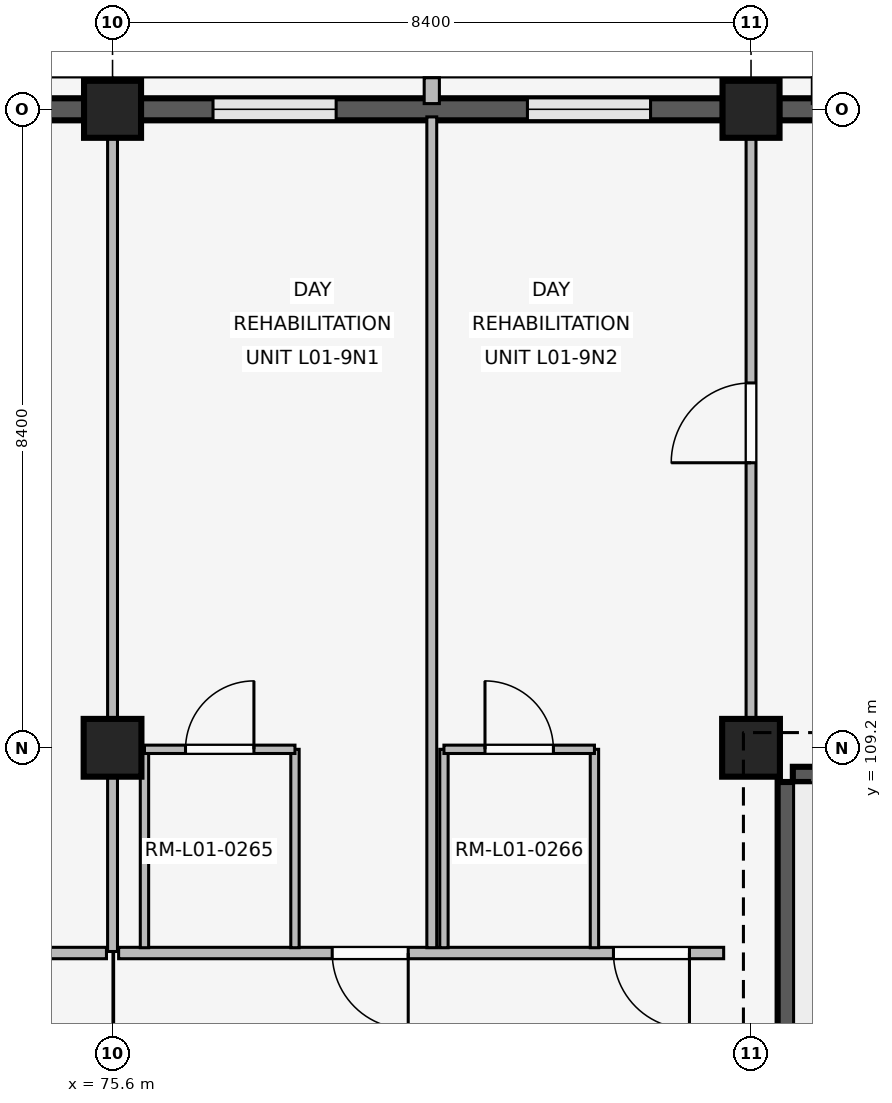
"""IFC4 building model, lengths in metres.
Left out: names, types, materials, properties, quantities, classifications, styles, units other than length and angle.
Written with IfcOpenShell. Run it as: python <this file> out.ifc"""

import sys

from ifc_helpers import new_model, si_unit, direction, frame, frame_2d, origin, origin_2d, place, context, subcontext, project, spatial, rectangle, extrude, element, fill, save


model = new_model("IFC4")
c1 = context("Model", 3, precision=1e-05, world=origin(), true_north=direction((0.0, 1.0)))
c2 = subcontext(c1, "Body", "Model", "MODEL_VIEW")
j1 = project(units=[si_unit("LENGTHUNIT", "METRE"), si_unit("PLANEANGLEUNIT", "RADIAN")], contexts=[c1])
p1 = place(None, origin())
s1 = spatial("IfcSite", under=j1, at=p1, CompositionType="ELEMENT")
p2 = place(p1, origin())
s2 = spatial("IfcBuilding", under=s1, at=p2, CompositionType="ELEMENT")
p3 = place(p2, frame((0.0, 0.0, 4.8)))
s3 = spatial("IfcBuildingStorey", under=s2, at=p3, CompositionType="ELEMENT", Elevation=4.8)
p4 = place(p3, frame((75.6, 109.2, 0.0), z_axis=(0.0, 0.0, 1.0), x_axis=(1.0, 0.0, 0.0)))
e1 = element("IfcColumn", 1, at=p4, inside=s3, PredefinedType="COLUMN", context=c2, shape_type="SweptSolid", body=[
    extrude(rectangle(XDim=0.76, YDim=0.76, at=origin_2d()), origin(), (0.0, 0.0, 1.0), 3.3),
])
p5 = place(p3, frame((75.6, 117.6, 0.0), z_axis=(0.0, 0.0, 1.0), x_axis=(1.0, 0.0, 0.0)))
e2 = element("IfcColumn", 2, at=p5, inside=s3, PredefinedType="COLUMN", context=c2, shape_type="SweptSolid", body=[
    extrude(rectangle(XDim=0.75, YDim=0.75, at=origin_2d()), origin(), (0.0, 0.0, 1.0), 3.3),
])
p6 = place(p3, frame((84.0, 109.2, 0.0), z_axis=(0.0, 0.0, 1.0), x_axis=(1.0, 0.0, 0.0)))
e3 = element("IfcColumn", 3, at=p6, inside=s3, PredefinedType="COLUMN", context=c2, shape_type="SweptSolid", body=[
    extrude(rectangle(XDim=0.76, YDim=0.76, at=origin_2d()), origin(), (0.0, 0.0, 1.0), 3.3),
])
p7 = place(p3, frame((84.0, 117.6, 0.0), z_axis=(0.0, 0.0, 1.0), x_axis=(1.0, 0.0, 0.0)))
e4 = element("IfcColumn", 4, at=p7, inside=s3, PredefinedType="COLUMN", context=c2, shape_type="SweptSolid", body=[
    extrude(rectangle(XDim=0.75, YDim=0.75, at=origin_2d()), origin(), (0.0, 0.0, 1.0), 3.3),
])
p8 = place(p3, frame((67.57, 117.6, 0.0), z_axis=(0.0, 0.0, 1.0), x_axis=(1.0, 0.0, 0.0)))
e5 = element("IfcWall", 5, at=p8, inside=s3, PredefinedType="SOLIDWALL", context=c2, shape_type="SweptSolid", body=[
    extrude(rectangle(XDim=7.66, YDim=0.29, at=frame_2d((3.83, 0.0))), origin(), (0.0, 0.0, 1.0), 2.42),
])
p9 = place(p8, frame((1.032, 0.0, 0.85)))
e6 = element("IfcOpeningElement", 6, at=p9, cuts=e5, PredefinedType="OPENING", context=c2, shape_type="SweptSolid", body=[
    extrude(rectangle(XDim=1.46, YDim=0.85, at=frame_2d((0.73, 0.425))), frame((0.0, 0.155, 0.0), z_axis=(0.0, -1.0, 0.0), x_axis=(1.0, 0.0, 0.0)), (0.0, 0.0, 1.0), 0.31),
])
p10 = place(p8, frame((5.168, 0.0, 0.85)))
e7 = element("IfcOpeningElement", 7, at=p10, cuts=e5, PredefinedType="OPENING", context=c2, shape_type="SweptSolid", body=[
    extrude(rectangle(XDim=1.46, YDim=0.85, at=frame_2d((0.73, 0.425))), frame((0.0, 0.155, 0.0), z_axis=(0.0, -1.0, 0.0), x_axis=(1.0, 0.0, 0.0)), (0.0, 0.0, 1.0), 0.31),
])
p11 = place(p3, frame((75.97, 117.6, 0.0), z_axis=(0.0, 0.0, 1.0), x_axis=(1.0, 0.0, 0.0)))
e8 = element("IfcWall", 8, at=p11, inside=s3, PredefinedType="SOLIDWALL", context=c2, shape_type="SweptSolid", body=[
    extrude(rectangle(XDim=7.66, YDim=0.29, at=frame_2d((3.83, 0.0))), origin(), (0.0, 0.0, 1.0), 2.42),
])
p12 = place(p11, frame((0.952, 0.0, 0.85)))
e9 = element("IfcOpeningElement", 9, at=p12, cuts=e8, PredefinedType="OPENING", context=c2, shape_type="SweptSolid", body=[
    extrude(rectangle(XDim=1.62, YDim=0.95, at=frame_2d((0.81, 0.475))), frame((0.0, 0.155, 0.0), z_axis=(0.0, -1.0, 0.0), x_axis=(1.0, 0.0, 0.0)), (0.0, 0.0, 1.0), 0.31),
])
p13 = place(p11, frame((5.088, 0.0, 0.85)))
e10 = element("IfcOpeningElement", 10, at=p13, cuts=e8, PredefinedType="OPENING", context=c2, shape_type="SweptSolid", body=[
    extrude(rectangle(XDim=1.62, YDim=0.95, at=frame_2d((0.81, 0.475))), frame((0.0, 0.155, 0.0), z_axis=(0.0, -1.0, 0.0), x_axis=(1.0, 0.0, 0.0)), (0.0, 0.0, 1.0), 0.31),
])
p14 = place(p3, frame((79.8, 117.675, 0.0), z_axis=(0.0, 0.0, 1.0), x_axis=(0.0, 1.0, 0.0)))
e11 = element("IfcWall", 11, at=p14, inside=s3, PredefinedType="ELEMENTEDWALL", context=c2, shape_type="SweptSolid", body=[
    extrude(rectangle(XDim=0.34, YDim=0.2, at=frame_2d((0.17, 0.0))), origin(), (0.0, 0.0, 1.0), 2.4),
])
p15 = place(p3, frame((84.37, 117.6, 0.0), z_axis=(0.0, 0.0, 1.0), x_axis=(1.0, 0.0, 0.0)))
e12 = element("IfcWall", 12, at=p15, inside=s3, PredefinedType="SOLIDWALL", context=c2, shape_type="SweptSolid", body=[
    extrude(rectangle(XDim=7.66, YDim=0.29, at=frame_2d((3.83, 0.0))), origin(), (0.0, 0.0, 1.0), 2.42),
])
p16 = place(p15, frame((1.032, 0.0, 0.85)))
e13 = element("IfcOpeningElement", 13, at=p16, cuts=e12, PredefinedType="OPENING", context=c2, shape_type="SweptSolid", body=[
    extrude(rectangle(XDim=1.46, YDim=0.85, at=frame_2d((0.73, 0.425))), frame((0.0, 0.155, 0.0), z_axis=(0.0, -1.0, 0.0), x_axis=(1.0, 0.0, 0.0)), (0.0, 0.0, 1.0), 0.31),
])
p17 = place(p15, frame((5.168, 0.0, 0.85)))
e14 = element("IfcOpeningElement", 14, at=p17, cuts=e12, PredefinedType="OPENING", context=c2, shape_type="SweptSolid", body=[
    extrude(rectangle(XDim=1.46, YDim=0.85, at=frame_2d((0.73, 0.425))), frame((0.0, 0.155, 0.0), z_axis=(0.0, -1.0, 0.0), x_axis=(1.0, 0.0, 0.0)), (0.0, 0.0, 1.0), 0.31),
])
p18 = place(p3, frame((84.55, 108.75, 0.0), z_axis=(0.0, 0.0, 1.0), x_axis=(1.0, 0.0, 0.0)))
e15 = element("IfcWall", 15, at=p18, inside=s3, PredefinedType="SHEAR", context=c2, shape_type="SweptSolid", body=[
    extrude(rectangle(XDim=7.5, YDim=0.4, at=frame_2d((3.75, 0.0))), origin(), (0.0, 0.0, 1.0), 3.02),
])
p19 = place(p3, frame((84.55, 101.2, 0.0), z_axis=(0.0, 0.0, 1.0), x_axis=(0.0, 1.0, 0.0)))
e16 = element("IfcWall", 16, at=p19, inside=s3, PredefinedType="SHEAR", context=c2, shape_type="SweptSolid", body=[
    extrude(rectangle(XDim=7.55, YDim=0.4, at=frame_2d((3.775, 0.0))), origin(), (0.0, 0.0, 1.0), 3.02),
])
p20 = place(p19, frame((0.28, 0.0, 0.0)))
e17 = element("IfcOpeningElement", 17, at=p20, cuts=e16, PredefinedType="OPENING", context=c2, shape_type="SweptSolid", body=[
    extrude(rectangle(XDim=1.0, YDim=2.15, at=frame_2d((0.5, 1.075))), frame((0.0, 0.21, 0.0), z_axis=(0.0, -1.0, 0.0), x_axis=(1.0, 0.0, 0.0)), (0.0, 0.0, 1.0), 0.42),
])
p21 = place(p3, frame((75.52, 106.5, 0.0), z_axis=(0.0, 0.0, 1.0), x_axis=(-1.0, 0.0, 0.0)))
e18 = element("IfcWall", 18, at=p21, inside=s3, PredefinedType="PARTITIONING", context=c2, shape_type="SweptSolid", body=[
    extrude(rectangle(XDim=8.24, YDim=0.15, at=frame_2d((4.12, 0.0))), origin(), (0.0, 0.0, 1.0), 2.4),
])
p22 = place(p21, frame((3.57, 0.0, 0.0)))
e19 = element("IfcOpeningElement", 19, at=p22, cuts=e18, PredefinedType="OPENING", context=c2, shape_type="SweptSolid", body=[
    extrude(rectangle(XDim=1.1, YDim=2.2, at=frame_2d((0.55, 1.1))), frame((0.0, 0.085, 0.0), z_axis=(0.0, -1.0, 0.0), x_axis=(1.0, 0.0, 0.0)), (0.0, 0.0, 1.0), 0.17),
])
p23 = place(p3, frame((75.6, 106.52, 0.0), z_axis=(0.0, 0.0, 1.0), x_axis=(0.0, 1.0, 0.0)))
e20 = element("IfcWall", 20, at=p23, inside=s3, PredefinedType="PARTITIONING", context=c2, shape_type="SweptSolid", body=[
    extrude(rectangle(XDim=10.94, YDim=0.13, at=frame_2d((5.47, 0.0))), origin(), (0.0, 0.0, 1.0), 2.4),
])
p24 = place(p3, frame((83.64, 106.5, 0.0), z_axis=(0.0, 0.0, 1.0), x_axis=(-1.0, 0.0, 0.0)))
e21 = element("IfcWall", 21, at=p24, inside=s3, PredefinedType="PARTITIONING", context=c2, shape_type="SweptSolid", body=[
    extrude(rectangle(XDim=7.96, YDim=0.15, at=frame_2d((3.98, 0.0))), origin(), (0.0, 0.0, 1.0), 2.4),
])
p25 = place(p24, frame((0.45, 0.0, 0.0)))
e22 = element("IfcOpeningElement", 22, at=p25, cuts=e21, PredefinedType="OPENING", context=c2, shape_type="SweptSolid", body=[
    extrude(rectangle(XDim=1.0, YDim=2.15, at=frame_2d((0.5, 1.075))), frame((0.0, 0.085, 0.0), z_axis=(0.0, -1.0, 0.0), x_axis=(1.0, 0.0, 0.0)), (0.0, 0.0, 1.0), 0.17),
])
p26 = place(p24, frame((4.15, 0.0, 0.0)))
e23 = element("IfcOpeningElement", 23, at=p26, cuts=e21, PredefinedType="OPENING", context=c2, shape_type="SweptSolid", body=[
    extrude(rectangle(XDim=1.0, YDim=2.15, at=frame_2d((0.5, 1.075))), frame((0.0, 0.085, 0.0), z_axis=(0.0, -1.0, 0.0), x_axis=(1.0, 0.0, 0.0)), (0.0, 0.0, 1.0), 0.17),
])
p27 = place(p3, frame((79.8, 106.57, 0.0), z_axis=(0.0, 0.0, 1.0), x_axis=(0.0, 1.0, 0.0)))
e24 = element("IfcWall", 24, at=p27, inside=s3, PredefinedType="PARTITIONING", context=c2, shape_type="SweptSolid", body=[
    extrude(rectangle(XDim=10.93, YDim=0.13, at=frame_2d((5.465, 0.0))), origin(), (0.0, 0.0, 1.0), 2.4),
])
for number, where, z_axis, x_axis in (
    (25, (76.02, 106.57, 0.0), (0.0, 0.0, 1.0), (0.0, 1.0, 0.0)),
    (26, (78.0, 106.57, 0.0), (0.0, 0.0, 1.0), (0.0, 1.0, 0.0)),
):
    element("IfcWall", number, at=place(p3, frame(where, z_axis=z_axis, x_axis=x_axis)), inside=s3, PredefinedType="PARTITIONING", context=c2, shape_type="SweptSolid", body=[
        extrude(rectangle(XDim=2.61, YDim=0.11, at=frame_2d((1.305, 0.0))), origin(), (0.0, 0.0, 1.0), 2.4),
    ])
p28 = place(p3, frame((76.02, 109.18, 0.0), z_axis=(0.0, 0.0, 1.0), x_axis=(1.0, 0.0, 0.0)))
e27 = element("IfcWall", 27, at=p28, inside=s3, PredefinedType="PARTITIONING", context=c2, shape_type="SweptSolid", body=[
    extrude(rectangle(XDim=1.98, YDim=0.11, at=frame_2d((0.99, 0.0))), origin(), (0.0, 0.0, 1.0), 2.4),
])
p29 = place(p28, frame((0.54, 0.0, 0.0)))
e28 = element("IfcOpeningElement", 28, at=p29, cuts=e27, PredefinedType="OPENING", context=c2, shape_type="SweptSolid", body=[
    extrude(rectangle(XDim=0.9, YDim=2.1, at=frame_2d((0.45, 1.05))), frame((0.0, 0.065, 0.0), z_axis=(0.0, -1.0, 0.0), x_axis=(1.0, 0.0, 0.0)), (0.0, 0.0, 1.0), 0.13),
])
for number, where, z_axis, x_axis in (
    (29, (79.96, 106.57, 0.0), (0.0, 0.0, 1.0), (0.0, 1.0, 0.0)),
    (30, (81.94, 106.57, 0.0), (0.0, 0.0, 1.0), (0.0, 1.0, 0.0)),
):
    element("IfcWall", number, at=place(p3, frame(where, z_axis=z_axis, x_axis=x_axis)), inside=s3, PredefinedType="PARTITIONING", context=c2, shape_type="SweptSolid", body=[
        extrude(rectangle(XDim=2.61, YDim=0.11, at=frame_2d((1.305, 0.0))), origin(), (0.0, 0.0, 1.0), 2.4),
    ])
p30 = place(p3, frame((79.96, 109.18, 0.0), z_axis=(0.0, 0.0, 1.0), x_axis=(1.0, 0.0, 0.0)))
e31 = element("IfcWall", 31, at=p30, inside=s3, PredefinedType="PARTITIONING", context=c2, shape_type="SweptSolid", body=[
    extrude(rectangle(XDim=1.98, YDim=0.11, at=frame_2d((0.99, 0.0))), origin(), (0.0, 0.0, 1.0), 2.4),
])
p31 = place(p30, frame((0.54, 0.0, 0.0)))
e32 = element("IfcOpeningElement", 32, at=p31, cuts=e31, PredefinedType="OPENING", context=c2, shape_type="SweptSolid", body=[
    extrude(rectangle(XDim=0.9, YDim=2.1, at=frame_2d((0.45, 1.05))), frame((0.0, 0.065, 0.0), z_axis=(0.0, -1.0, 0.0), x_axis=(1.0, 0.0, 0.0)), (0.0, 0.0, 1.0), 0.13),
])
p32 = place(p3, frame((84.0, 109.55, 0.0), z_axis=(0.0, 0.0, 1.0), x_axis=(0.0, 1.0, 0.0)))
e33 = element("IfcWall", 33, at=p32, inside=s3, PredefinedType="PARTITIONING", context=c2, shape_type="SweptSolid", body=[
    extrude(rectangle(XDim=7.91, YDim=0.13, at=frame_2d((3.955, 0.0))), origin(), (0.0, 0.0, 1.0), 2.4),
])
p33 = place(p32, frame((3.4, 0.0, 0.0)))
e34 = element("IfcOpeningElement", 34, at=p33, cuts=e33, PredefinedType="OPENING", context=c2, shape_type="SweptSolid", body=[
    extrude(rectangle(XDim=1.05, YDim=2.2, at=frame_2d((0.525, 1.1))), frame((0.0, 0.075, 0.0), z_axis=(0.0, -1.0, 0.0), x_axis=(1.0, 0.0, 0.0)), (0.0, 0.0, 1.0), 0.15),
])
p34 = place(p12, origin())
e35 = element("IfcWindow", 35, at=p34, inside=s3, PartitioningType="SINGLE_PANEL", PredefinedType="WINDOW", context=c2, shape_type="SweptSolid", body=[
    extrude(rectangle(XDim=1.62, YDim=0.95, at=frame_2d((0.81, 0.475))), frame((0.0, 0.03, 0.0), z_axis=(0.0, -1.0, 0.0), x_axis=(1.0, 0.0, 0.0)), (0.0, 0.0, 1.0), 0.06),
])
fill(e9, e35)
p35 = place(p13, origin())
e36 = element("IfcWindow", 36, at=p35, inside=s3, PartitioningType="SINGLE_PANEL", PredefinedType="WINDOW", context=c2, shape_type="SweptSolid", body=[
    extrude(rectangle(XDim=1.62, YDim=0.95, at=frame_2d((0.81, 0.475))), frame((0.0, 0.03, 0.0), z_axis=(0.0, -1.0, 0.0), x_axis=(1.0, 0.0, 0.0)), (0.0, 0.0, 1.0), 0.06),
])
fill(e10, e36)
p36 = place(p25, origin())
e37 = element("IfcDoor", 37, at=p36, inside=s3, OperationType="SINGLE_SWING_LEFT", PredefinedType="DOOR", context=c2, shape_type="SweptSolid", body=[
    extrude(rectangle(XDim=1.0, YDim=2.15, at=frame_2d((0.5, 1.075))), frame((0.0, 0.025, 0.0), z_axis=(0.0, -1.0, 0.0), x_axis=(1.0, 0.0, 0.0)), (0.0, 0.0, 1.0), 0.05),
])
fill(e22, e37)
p37 = place(p26, origin())
e38 = element("IfcDoor", 38, at=p37, inside=s3, OperationType="SINGLE_SWING_LEFT", PredefinedType="DOOR", context=c2, shape_type="SweptSolid", body=[
    extrude(rectangle(XDim=1.0, YDim=2.15, at=frame_2d((0.5, 1.075))), frame((0.0, 0.025, 0.0), z_axis=(0.0, -1.0, 0.0), x_axis=(1.0, 0.0, 0.0)), (0.0, 0.0, 1.0), 0.05),
])
fill(e23, e38)
p38 = place(p29, origin())
e39 = element("IfcDoor", 39, at=p38, inside=s3, OperationType="SINGLE_SWING_RIGHT", PredefinedType="DOOR", context=c2, shape_type="SweptSolid", body=[
    extrude(rectangle(XDim=0.9, YDim=2.1, at=frame_2d((0.45, 1.05))), frame((0.0, 0.025, 0.0), z_axis=(0.0, -1.0, 0.0), x_axis=(1.0, 0.0, 0.0)), (0.0, 0.0, 1.0), 0.05),
])
fill(e28, e39)
p39 = place(p31, origin())
e40 = element("IfcDoor", 40, at=p39, inside=s3, OperationType="SINGLE_SWING_LEFT", PredefinedType="DOOR", context=c2, shape_type="SweptSolid", body=[
    extrude(rectangle(XDim=0.9, YDim=2.1, at=frame_2d((0.45, 1.05))), frame((0.0, 0.025, 0.0), z_axis=(0.0, -1.0, 0.0), x_axis=(1.0, 0.0, 0.0)), (0.0, 0.0, 1.0), 0.05),
])
fill(e32, e40)
p40 = place(p33, origin())
e41 = element("IfcDoor", 41, at=p40, inside=s3, OperationType="SINGLE_SWING_LEFT", PredefinedType="DOOR", context=c2, shape_type="SweptSolid", body=[
    extrude(rectangle(XDim=1.05, YDim=2.2, at=frame_2d((0.525, 1.1))), frame((0.0, 0.025, 0.0), z_axis=(0.0, -1.0, 0.0), x_axis=(1.0, 0.0, 0.0)), (0.0, 0.0, 1.0), 0.05),
])
fill(e34, e41)
save(model, sys.argv[1])
